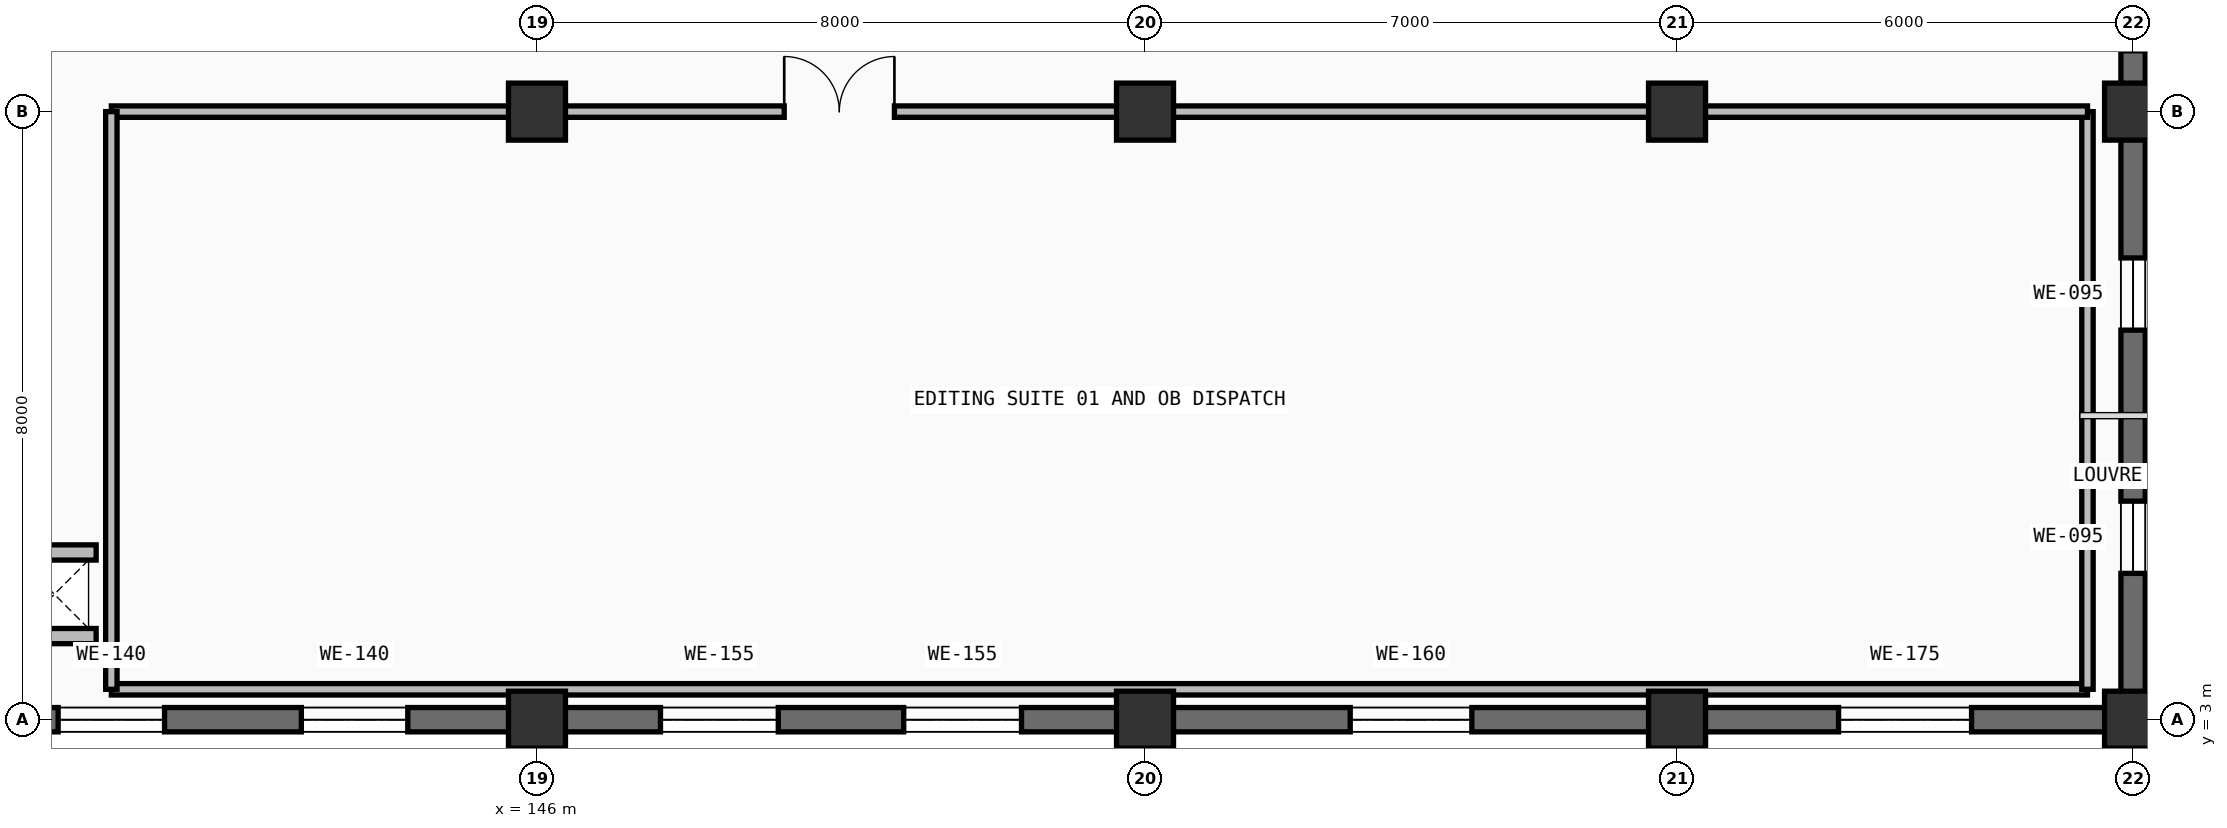
"""IFC4 building model, lengths in metres.
Left out: names, types, materials, properties, quantities, classifications, styles, units other than length and angle.
Written with IfcOpenShell. Run it as: python <this file> out.ifc"""

import sys

from ifc_helpers import new_model, si_unit, direction, frame, frame_2d, origin, origin_2d, place, context, subcontext, project, spatial, rectangle, extrude, element, fill, save


model = new_model("IFC4")
c1 = context("Model", 3, precision=1e-05, world=origin(), true_north=direction((0.0, 1.0)))
c2 = subcontext(c1, "Body", "Model", "MODEL_VIEW")
j1 = project(units=[si_unit("LENGTHUNIT", "METRE"), si_unit("PLANEANGLEUNIT", "RADIAN")], contexts=[c1])
p1 = place(None, origin())
s1 = spatial("IfcSite", under=j1, at=p1, CompositionType="ELEMENT")
p2 = place(p1, origin())
s2 = spatial("IfcBuilding", under=s1, at=p2, CompositionType="ELEMENT")
p3 = place(p2, origin())
s3 = spatial("IfcBuildingStorey", under=s2, at=p3, CompositionType="ELEMENT", Elevation=0.0)
for number, where, z_axis, x_axis in (
    (1, (146.0, 3.0, 0.0), (0.0, 0.0, 1.0), (1.0, 0.0, 0.0)),
    (2, (146.0, 11.0, 0.0), (0.0, 0.0, 1.0), (1.0, 0.0, 0.0)),
    (3, (154.0, 3.0, 0.0), (0.0, 0.0, 1.0), (1.0, 0.0, 0.0)),
    (4, (154.0, 11.0, 0.0), (0.0, 0.0, 1.0), (1.0, 0.0, 0.0)),
    (5, (161.0, 3.0, 0.0), (0.0, 0.0, 1.0), (1.0, 0.0, 0.0)),
    (6, (161.0, 11.0, 0.0), (0.0, 0.0, 1.0), (1.0, 0.0, 0.0)),
    (7, (167.0, 3.0, 0.0), (0.0, 0.0, 1.0), (1.0, 0.0, 0.0)),
    (8, (167.0, 11.0, 0.0), (0.0, 0.0, 1.0), (1.0, 0.0, 0.0)),
):
    element("IfcColumn", number, at=place(p3, frame(where, z_axis=z_axis, x_axis=x_axis)), inside=s3, PredefinedType="COLUMN", context=c2, shape_type="SweptSolid", body=[
        extrude(rectangle(XDim=0.75, YDim=0.75, at=origin_2d()), origin(), (0.0, 0.0, 1.0), 5.4),
    ])
p4 = place(p3, frame((167.0, 19.0, 0.0), z_axis=(0.0, 0.0, 1.0), x_axis=(0.0, -1.0, 0.0)))
e9 = element("IfcWall", 9, at=p4, inside=s3, PredefinedType="SOLIDWALL", context=c2, shape_type="SweptSolid", body=[
    extrude(rectangle(XDim=8.0, YDim=0.32, at=frame_2d((4.0, 0.0))), origin(), (0.0, 0.0, 1.0), 5.4),
])
p5 = place(p4, frame((5.2, 0.0, 0.0)))
e10 = element("IfcOpeningElement", 10, at=p5, cuts=e9, PredefinedType="OPENING", context=c2, shape_type="SweptSolid", body=[
    extrude(rectangle(XDim=2.0, YDim=2.6, at=frame_2d((1.0, 1.3))), frame((0.0, 0.17, 0.0), z_axis=(0.0, -1.0, 0.0), x_axis=(1.0, 0.0, 0.0)), (0.0, 0.0, 1.0), 0.34),
])
p6 = place(p3, frame((167.0, 11.0, 0.0), z_axis=(0.0, 0.0, 1.0), x_axis=(0.0, -1.0, 0.0)))
e11 = element("IfcWall", 11, at=p6, inside=s3, PredefinedType="SOLIDWALL", context=c2, shape_type="SweptSolid", body=[
    extrude(rectangle(XDim=8.0, YDim=0.32, at=frame_2d((4.0, 0.0))), origin(), (0.0, 0.0, 1.0), 5.4),
])
p7 = place(p6, frame((1.925, 0.0, 1.0)))
e12 = element("IfcOpeningElement", 12, at=p7, cuts=e11, PredefinedType="OPENING", context=c2, shape_type="SweptSolid", body=[
    extrude(rectangle(XDim=0.95, YDim=1.35, at=frame_2d((0.475, 0.675))), frame((0.0, 0.17, 0.0), z_axis=(0.0, -1.0, 0.0), x_axis=(1.0, 0.0, 0.0)), (0.0, 0.0, 1.0), 0.34),
])
p8 = place(p6, frame((5.125, 0.0, 1.0)))
e13 = element("IfcOpeningElement", 13, at=p8, cuts=e11, PredefinedType="OPENING", context=c2, shape_type="SweptSolid", body=[
    extrude(rectangle(XDim=0.95, YDim=1.35, at=frame_2d((0.475, 0.675))), frame((0.0, 0.17, 0.0), z_axis=(0.0, -1.0, 0.0), x_axis=(1.0, 0.0, 0.0)), (0.0, 0.0, 1.0), 0.34),
])
p9 = place(p3, frame((167.0, 3.0, 0.0), z_axis=(0.0, 0.0, 1.0), x_axis=(-1.0, 0.0, 0.0)))
e14 = element("IfcWall", 14, at=p9, inside=s3, PredefinedType="SOLIDWALL", context=c2, shape_type="SweptSolid", body=[
    extrude(rectangle(XDim=6.0, YDim=0.32, at=frame_2d((3.0, 0.0))), origin(), (0.0, 0.0, 1.0), 5.4),
])
p10 = place(p9, frame((2.125, 0.0, 1.0)))
e15 = element("IfcOpeningElement", 15, at=p10, cuts=e14, PredefinedType="OPENING", context=c2, shape_type="SweptSolid", body=[
    extrude(rectangle(XDim=1.75, YDim=2.1, at=frame_2d((0.875, 1.05))), frame((0.0, 0.17, 0.0), z_axis=(0.0, -1.0, 0.0), x_axis=(1.0, 0.0, 0.0)), (0.0, 0.0, 1.0), 0.34),
])
p11 = place(p3, frame((161.0, 3.0, 0.0), z_axis=(0.0, 0.0, 1.0), x_axis=(-1.0, 0.0, 0.0)))
e16 = element("IfcWall", 16, at=p11, inside=s3, PredefinedType="SOLIDWALL", context=c2, shape_type="SweptSolid", body=[
    extrude(rectangle(XDim=7.0, YDim=0.32, at=frame_2d((3.5, 0.0))), origin(), (0.0, 0.0, 1.0), 5.4),
])
p12 = place(p11, frame((2.7, 0.0, 1.0)))
e17 = element("IfcOpeningElement", 17, at=p12, cuts=e16, PredefinedType="OPENING", context=c2, shape_type="SweptSolid", body=[
    extrude(rectangle(XDim=1.6, YDim=2.0, at=frame_2d((0.8, 1.0))), frame((0.0, 0.17, 0.0), z_axis=(0.0, -1.0, 0.0), x_axis=(1.0, 0.0, 0.0)), (0.0, 0.0, 1.0), 0.34),
])
p13 = place(p3, frame((154.0, 3.0, 0.0), z_axis=(0.0, 0.0, 1.0), x_axis=(-1.0, 0.0, 0.0)))
e18 = element("IfcWall", 18, at=p13, inside=s3, PredefinedType="SOLIDWALL", context=c2, shape_type="SweptSolid", body=[
    extrude(rectangle(XDim=8.0, YDim=0.32, at=frame_2d((4.0, 0.0))), origin(), (0.0, 0.0, 1.0), 5.4),
])
p14 = place(p13, frame((1.625, 0.0, 1.0)))
e19 = element("IfcOpeningElement", 19, at=p14, cuts=e18, PredefinedType="OPENING", context=c2, shape_type="SweptSolid", body=[
    extrude(rectangle(XDim=1.55, YDim=1.95, at=frame_2d((0.775, 0.975))), frame((0.0, 0.17, 0.0), z_axis=(0.0, -1.0, 0.0), x_axis=(1.0, 0.0, 0.0)), (0.0, 0.0, 1.0), 0.34),
])
p15 = place(p13, frame((4.825, 0.0, 1.0)))
e20 = element("IfcOpeningElement", 20, at=p15, cuts=e18, PredefinedType="OPENING", context=c2, shape_type="SweptSolid", body=[
    extrude(rectangle(XDim=1.55, YDim=1.95, at=frame_2d((0.775, 0.975))), frame((0.0, 0.17, 0.0), z_axis=(0.0, -1.0, 0.0), x_axis=(1.0, 0.0, 0.0)), (0.0, 0.0, 1.0), 0.34),
])
p16 = place(p3, frame((146.0, 3.0, 0.0), z_axis=(0.0, 0.0, 1.0), x_axis=(-1.0, 0.0, 0.0)))
e21 = element("IfcWall", 21, at=p16, inside=s3, PredefinedType="SOLIDWALL", context=c2, shape_type="SweptSolid", body=[
    extrude(rectangle(XDim=8.0, YDim=0.32, at=frame_2d((4.0, 0.0))), origin(), (0.0, 0.0, 1.0), 5.4),
])
p17 = place(p16, frame((1.7, 0.0, 1.0)))
e22 = element("IfcOpeningElement", 22, at=p17, cuts=e21, PredefinedType="OPENING", context=c2, shape_type="SweptSolid", body=[
    extrude(rectangle(XDim=1.4, YDim=1.75, at=frame_2d((0.7, 0.875))), frame((0.0, 0.17, 0.0), z_axis=(0.0, -1.0, 0.0), x_axis=(1.0, 0.0, 0.0)), (0.0, 0.0, 1.0), 0.34),
])
p18 = place(p16, frame((4.9, 0.0, 1.0)))
e23 = element("IfcOpeningElement", 23, at=p18, cuts=e21, PredefinedType="OPENING", context=c2, shape_type="SweptSolid", body=[
    extrude(rectangle(XDim=1.4, YDim=1.75, at=frame_2d((0.7, 0.875))), frame((0.0, 0.17, 0.0), z_axis=(0.0, -1.0, 0.0), x_axis=(1.0, 0.0, 0.0)), (0.0, 0.0, 1.0), 0.34),
])
p19 = place(p3, frame((140.4, 3.4, 0.0), z_axis=(0.0, 0.0, 1.0), x_axis=(1.0, 0.0, 0.0)))
e24 = element("IfcWall", 24, at=p19, inside=s3, PredefinedType="PARTITIONING", context=c2, shape_type="SweptSolid", body=[
    extrude(rectangle(XDim=26.0, YDim=0.15, at=frame_2d((13.0, 0.0))), origin(), (0.0, 0.0, 1.0), 4.405),
])
p20 = place(p3, frame((166.4, 3.4, 0.0), z_axis=(0.0, 0.0, 1.0), x_axis=(0.0, 1.0, 0.0)))
e25 = element("IfcWall", 25, at=p20, inside=s3, PredefinedType="PARTITIONING", context=c2, shape_type="SweptSolid", body=[
    extrude(rectangle(XDim=7.6, YDim=0.15, at=frame_2d((3.8, 0.0))), origin(), (0.0, 0.0, 1.0), 5.1),
])
p21 = place(p3, frame((140.4, 11.0, 0.0), z_axis=(0.0, 0.0, 1.0), x_axis=(1.0, 0.0, 0.0)))
e26 = element("IfcWall", 26, at=p21, inside=s3, PredefinedType="PARTITIONING", context=c2, shape_type="SweptSolid", body=[
    extrude(rectangle(XDim=26.0, YDim=0.15, at=frame_2d((13.0, 0.0))), origin(), (0.0, 0.0, 1.0), 4.335),
])
p22 = place(p21, frame((8.853, 0.0, 0.0)))
e27 = element("IfcOpeningElement", 27, at=p22, cuts=e26, PredefinedType="OPENING", context=c2, shape_type="SweptSolid", body=[
    extrude(rectangle(XDim=1.45, YDim=2.25, at=frame_2d((0.725, 1.125))), frame((0.0, 0.085, 0.0), z_axis=(0.0, -1.0, 0.0), x_axis=(1.0, 0.0, 0.0)), (0.0, 0.0, 1.0), 0.17),
])
p23 = place(p3, frame((140.4, 3.4, 0.0), z_axis=(0.0, 0.0, 1.0), x_axis=(0.0, 1.0, 0.0)))
e28 = element("IfcWall", 28, at=p23, inside=s3, PredefinedType="PARTITIONING", context=c2, shape_type="SweptSolid", body=[
    extrude(rectangle(XDim=7.6, YDim=0.15, at=frame_2d((3.8, 0.0))), origin(), (0.0, 0.0, 1.0), 5.1),
])
for number, where, z_axis, x_axis in (
    (29, (139.1, 4.1, 0.0), (0.0, 0.0, 1.0), (1.0, 0.0, 0.0)),
    (30, (139.1, 5.2, 0.0), (0.0, 0.0, 1.0), (1.0, 0.0, 0.0)),
):
    element("IfcWall", number, at=place(p3, frame(where, z_axis=z_axis, x_axis=x_axis)), inside=s3, PredefinedType="PARTITIONING", context=c2, shape_type="SweptSolid", body=[
        extrude(rectangle(XDim=1.1, YDim=0.2, at=frame_2d((0.55, 0.0))), origin(), (0.0, 0.0, 1.0), 5.1),
    ])
p24 = place(p7, origin())
e31 = element("IfcWindow", 31, at=p24, inside=s3, PartitioningType="SINGLE_PANEL", PredefinedType="WINDOW", context=c2, shape_type="SweptSolid", body=[
    extrude(rectangle(XDim=0.95, YDim=1.35, at=frame_2d((0.475, 0.675))), frame((0.0, 0.03, 0.0), z_axis=(0.0, -1.0, 0.0), x_axis=(1.0, 0.0, 0.0)), (0.0, 0.0, 1.0), 0.06),
])
fill(e12, e31)
p25 = place(p8, origin())
e32 = element("IfcWindow", 32, at=p25, inside=s3, PartitioningType="SINGLE_PANEL", PredefinedType="WINDOW", context=c2, shape_type="SweptSolid", body=[
    extrude(rectangle(XDim=0.95, YDim=1.35, at=frame_2d((0.475, 0.675))), frame((0.0, 0.03, 0.0), z_axis=(0.0, -1.0, 0.0), x_axis=(1.0, 0.0, 0.0)), (0.0, 0.0, 1.0), 0.06),
])
fill(e13, e32)
p26 = place(p10, origin())
e33 = element("IfcWindow", 33, at=p26, inside=s3, PartitioningType="SINGLE_PANEL", PredefinedType="WINDOW", context=c2, shape_type="SweptSolid", body=[
    extrude(rectangle(XDim=1.75, YDim=2.1, at=frame_2d((0.875, 1.05))), frame((0.0, 0.03, 0.0), z_axis=(0.0, -1.0, 0.0), x_axis=(1.0, 0.0, 0.0)), (0.0, 0.0, 1.0), 0.06),
])
fill(e15, e33)
p27 = place(p12, origin())
e34 = element("IfcWindow", 34, at=p27, inside=s3, PartitioningType="SINGLE_PANEL", PredefinedType="WINDOW", context=c2, shape_type="SweptSolid", body=[
    extrude(rectangle(XDim=1.6, YDim=2.0, at=frame_2d((0.8, 1.0))), frame((0.0, 0.03, 0.0), z_axis=(0.0, -1.0, 0.0), x_axis=(1.0, 0.0, 0.0)), (0.0, 0.0, 1.0), 0.06),
])
fill(e17, e34)
p28 = place(p14, origin())
e35 = element("IfcWindow", 35, at=p28, inside=s3, PartitioningType="SINGLE_PANEL", PredefinedType="WINDOW", context=c2, shape_type="SweptSolid", body=[
    extrude(rectangle(XDim=1.55, YDim=1.95, at=frame_2d((0.775, 0.975))), frame((0.0, 0.03, 0.0), z_axis=(0.0, -1.0, 0.0), x_axis=(1.0, 0.0, 0.0)), (0.0, 0.0, 1.0), 0.06),
])
fill(e19, e35)
p29 = place(p15, origin())
e36 = element("IfcWindow", 36, at=p29, inside=s3, PartitioningType="SINGLE_PANEL", PredefinedType="WINDOW", context=c2, shape_type="SweptSolid", body=[
    extrude(rectangle(XDim=1.55, YDim=1.95, at=frame_2d((0.775, 0.975))), frame((0.0, 0.03, 0.0), z_axis=(0.0, -1.0, 0.0), x_axis=(1.0, 0.0, 0.0)), (0.0, 0.0, 1.0), 0.06),
])
fill(e20, e36)
p30 = place(p17, origin())
e37 = element("IfcWindow", 37, at=p30, inside=s3, PartitioningType="SINGLE_PANEL", PredefinedType="WINDOW", context=c2, shape_type="SweptSolid", body=[
    extrude(rectangle(XDim=1.4, YDim=1.75, at=frame_2d((0.7, 0.875))), frame((0.0, 0.03, 0.0), z_axis=(0.0, -1.0, 0.0), x_axis=(1.0, 0.0, 0.0)), (0.0, 0.0, 1.0), 0.06),
])
fill(e22, e37)
p31 = place(p18, origin())
e38 = element("IfcWindow", 38, at=p31, inside=s3, PartitioningType="SINGLE_PANEL", PredefinedType="WINDOW", context=c2, shape_type="SweptSolid", body=[
    extrude(rectangle(XDim=1.4, YDim=1.75, at=frame_2d((0.7, 0.875))), frame((0.0, 0.03, 0.0), z_axis=(0.0, -1.0, 0.0), x_axis=(1.0, 0.0, 0.0)), (0.0, 0.0, 1.0), 0.06),
])
fill(e23, e38)
p32 = place(p22, origin())
e39 = element("IfcDoor", 39, at=p32, inside=s3, OperationType="DOUBLE_DOOR_SINGLE_SWING", PredefinedType="DOOR", context=c2, shape_type="SweptSolid", body=[
    extrude(rectangle(XDim=1.45, YDim=2.25, at=frame_2d((0.725, 1.125))), frame((0.0, 0.025, 0.0), z_axis=(0.0, -1.0, 0.0), x_axis=(1.0, 0.0, 0.0)), (0.0, 0.0, 1.0), 0.05),
])
fill(e27, e39)
save(model, sys.argv[1])
